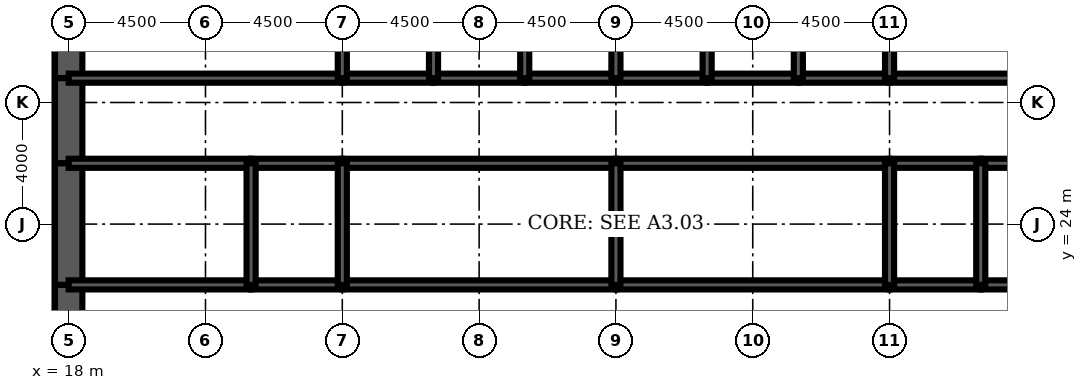
"""IFC4 building model, lengths in metres.
Left out: names, types, materials, properties, quantities, classifications, styles, units other than length and angle.
Written with IfcOpenShell. Run it as: python <this file> out.ifc"""

import sys

from ifc_helpers import new_model, si_unit, direction, frame, frame_2d, origin, place, context, subcontext, project, spatial, rectangle, extrude, element, fill, save


model = new_model("IFC4")
c1 = context("Model", 3, precision=1e-05, world=origin(), true_north=direction((0.0, 1.0)))
c2 = subcontext(c1, "Body", "Model", "MODEL_VIEW")
j1 = project(units=[si_unit("LENGTHUNIT", "METRE"), si_unit("PLANEANGLEUNIT", "RADIAN")], contexts=[c1])
p1 = place(None, origin())
s1 = spatial("IfcSite", under=j1, at=p1, CompositionType="ELEMENT")
p2 = place(p1, origin())
s2 = spatial("IfcBuilding", under=s1, at=p2, CompositionType="ELEMENT")
p3 = place(p2, frame((0.0, 0.0, 6.0)))
s3 = spatial("IfcBuildingStorey", under=s2, at=p3, CompositionType="ELEMENT", Elevation=6.0)
p4 = place(p3, frame((18.0, 32.0, 0.0), z_axis=(0.0, 0.0, 1.0), x_axis=(0.0, -1.0, 0.0)))
e1 = element("IfcWall", 1, at=p4, inside=s3, PredefinedType="SHEAR", context=c2, shape_type="SweptSolid", body=[
    extrude(rectangle(XDim=3.2, YDim=0.9, at=frame_2d((1.6, 0.0))), origin(), (0.0, 0.0, 1.0), 7.0),
])
p5 = place(p3, frame((18.0, 28.8, 0.0), z_axis=(0.0, 0.0, 1.0), x_axis=(0.0, -1.0, 0.0)))
e2 = element("IfcWall", 2, at=p5, inside=s3, PredefinedType="SHEAR", context=c2, shape_type="SweptSolid", body=[
    extrude(rectangle(XDim=2.8, YDim=0.9, at=frame_2d((1.4, 0.0))), origin(), (0.0, 0.0, 1.0), 7.0),
])
p6 = place(p5, frame((0.4, 0.0, 0.0)))
e3 = element("IfcOpeningElement", 3, at=p6, cuts=e2, PredefinedType="OPENING", context=c2, shape_type="SweptSolid", body=[
    extrude(rectangle(XDim=1.8, YDim=2.1, at=frame_2d((0.9, 1.05))), frame((0.0, 0.46, 0.0), z_axis=(0.0, -1.0, 0.0), x_axis=(1.0, 0.0, 0.0)), (0.0, 0.0, 1.0), 0.92),
])
p7 = place(p3, frame((18.0, 26.0, 0.0), z_axis=(0.0, 0.0, 1.0), x_axis=(0.0, -1.0, 0.0)))
e4 = element("IfcWall", 4, at=p7, inside=s3, PredefinedType="SHEAR", context=c2, shape_type="SweptSolid", body=[
    extrude(rectangle(XDim=4.0, YDim=0.9, at=frame_2d((2.0, 0.0))), origin(), (0.0, 0.0, 1.0), 7.0),
])
p8 = place(p3, frame((18.0, 22.0, 0.0), z_axis=(0.0, 0.0, 1.0), x_axis=(0.0, -1.0, 0.0)))
e5 = element("IfcWall", 5, at=p8, inside=s3, PredefinedType="SHEAR", context=c2, shape_type="SweptSolid", body=[
    extrude(rectangle(XDim=2.8, YDim=0.9, at=frame_2d((1.4, 0.0))), origin(), (0.0, 0.0, 1.0), 7.0),
])
p9 = place(p8, frame((0.6, 0.0, 0.0)))
e6 = element("IfcOpeningElement", 6, at=p9, cuts=e5, PredefinedType="OPENING", context=c2, shape_type="SweptSolid", body=[
    extrude(rectangle(XDim=1.8, YDim=2.1, at=frame_2d((0.9, 1.05))), frame((0.0, 0.46, 0.0), z_axis=(0.0, -1.0, 0.0), x_axis=(1.0, 0.0, 0.0)), (0.0, 0.0, 1.0), 0.92),
])
p10 = place(p3, frame((18.0, 28.8, 0.0), z_axis=(0.0, 0.0, 1.0), x_axis=(1.0, 0.0, 0.0)))
e7 = element("IfcWall", 7, at=p10, inside=s3, PredefinedType="SOLIDWALL", context=c2, shape_type="SweptSolid", body=[
    extrude(rectangle(XDim=9.0, YDim=0.3, at=frame_2d((4.5, 0.0))), origin(), (0.0, 0.0, 1.0), 7.0),
])
p11 = place(p10, frame((0.65, 0.0, 0.0)))
e8 = element("IfcOpeningElement", 8, at=p11, cuts=e7, PredefinedType="OPENING", context=c2, shape_type="SweptSolid", body=[
    extrude(rectangle(XDim=1.0, YDim=2.1, at=frame_2d((0.5, 1.05))), frame((0.0, 0.16, 0.0), z_axis=(0.0, -1.0, 0.0), x_axis=(1.0, 0.0, 0.0)), (0.0, 0.0, 1.0), 0.32),
])
p12 = place(p3, frame((27.0, 28.8, 0.0), z_axis=(0.0, 0.0, 1.0), x_axis=(1.0, 0.0, 0.0)))
e9 = element("IfcWall", 9, at=p12, inside=s3, PredefinedType="SOLIDWALL", context=c2, shape_type="SweptSolid", body=[
    extrude(rectangle(XDim=3.0, YDim=0.3, at=frame_2d((1.5, 0.0))), origin(), (0.0, 0.0, 1.0), 7.0),
])
p13 = place(p12, frame((0.95, 0.0, 0.0)))
e10 = element("IfcOpeningElement", 10, at=p13, cuts=e9, PredefinedType="OPENING", context=c2, shape_type="SweptSolid", body=[
    extrude(rectangle(XDim=1.1, YDim=2.2, at=frame_2d((0.55, 1.1))), frame((0.0, 0.16, 0.0), z_axis=(0.0, -1.0, 0.0), x_axis=(1.0, 0.0, 0.0)), (0.0, 0.0, 1.0), 0.32),
])
p14 = place(p3, frame((30.0, 28.8, 0.0), z_axis=(0.0, 0.0, 1.0), x_axis=(1.0, 0.0, 0.0)))
e11 = element("IfcWall", 11, at=p14, inside=s3, PredefinedType="SOLIDWALL", context=c2, shape_type="SweptSolid", body=[
    extrude(rectangle(XDim=3.0, YDim=0.3, at=frame_2d((1.5, 0.0))), origin(), (0.0, 0.0, 1.0), 7.0),
])
p15 = place(p14, frame((0.95, 0.0, 0.0)))
e12 = element("IfcOpeningElement", 12, at=p15, cuts=e11, PredefinedType="OPENING", context=c2, shape_type="SweptSolid", body=[
    extrude(rectangle(XDim=1.1, YDim=2.2, at=frame_2d((0.55, 1.1))), frame((0.0, 0.16, 0.0), z_axis=(0.0, -1.0, 0.0), x_axis=(1.0, 0.0, 0.0)), (0.0, 0.0, 1.0), 0.32),
])
p16 = place(p3, frame((33.0, 28.8, 0.0), z_axis=(0.0, 0.0, 1.0), x_axis=(1.0, 0.0, 0.0)))
e13 = element("IfcWall", 13, at=p16, inside=s3, PredefinedType="SOLIDWALL", context=c2, shape_type="SweptSolid", body=[
    extrude(rectangle(XDim=3.0, YDim=0.3, at=frame_2d((1.5, 0.0))), origin(), (0.0, 0.0, 1.0), 7.0),
])
p17 = place(p16, frame((0.95, 0.0, 0.0)))
e14 = element("IfcOpeningElement", 14, at=p17, cuts=e13, PredefinedType="OPENING", context=c2, shape_type="SweptSolid", body=[
    extrude(rectangle(XDim=1.1, YDim=2.2, at=frame_2d((0.55, 1.1))), frame((0.0, 0.16, 0.0), z_axis=(0.0, -1.0, 0.0), x_axis=(1.0, 0.0, 0.0)), (0.0, 0.0, 1.0), 0.32),
])
for number, where, z_axis, x_axis in (
    (15, (36.0, 28.8, 0.0), (0.0, 0.0, 1.0), (1.0, 0.0, 0.0)),
    (16, (39.0, 28.8, 0.0), (0.0, 0.0, 1.0), (1.0, 0.0, 0.0)),
):
    element("IfcWall", number, at=place(p3, frame(where, z_axis=z_axis, x_axis=x_axis)), inside=s3, PredefinedType="SOLIDWALL", context=c2, shape_type="SweptSolid", body=[
        extrude(rectangle(XDim=3.0, YDim=0.3, at=frame_2d((1.5, 0.0))), origin(), (0.0, 0.0, 1.0), 7.0),
    ])
p18 = place(p3, frame((42.0, 28.8, 0.0), z_axis=(0.0, 0.0, 1.0), x_axis=(1.0, 0.0, 0.0)))
e17 = element("IfcWall", 17, at=p18, inside=s3, PredefinedType="SOLIDWALL", context=c2, shape_type="SweptSolid", body=[
    extrude(rectangle(XDim=3.0, YDim=0.3, at=frame_2d((1.5, 0.0))), origin(), (0.0, 0.0, 1.0), 7.0),
])
p19 = place(p18, frame((0.95, 0.0, 0.0)))
e18 = element("IfcOpeningElement", 18, at=p19, cuts=e17, PredefinedType="OPENING", context=c2, shape_type="SweptSolid", body=[
    extrude(rectangle(XDim=1.1, YDim=2.2, at=frame_2d((0.55, 1.1))), frame((0.0, 0.16, 0.0), z_axis=(0.0, -1.0, 0.0), x_axis=(1.0, 0.0, 0.0)), (0.0, 0.0, 1.0), 0.32),
])
p20 = place(p3, frame((45.0, 28.8, 0.0), z_axis=(0.0, 0.0, 1.0), x_axis=(1.0, 0.0, 0.0)))
e19 = element("IfcWall", 19, at=p20, inside=s3, PredefinedType="SOLIDWALL", context=c2, shape_type="SweptSolid", body=[
    extrude(rectangle(XDim=9.0, YDim=0.3, at=frame_2d((4.5, 0.0))), origin(), (0.0, 0.0, 1.0), 7.0),
])
p21 = place(p20, frame((7.35, 0.0, 0.0)))
e20 = element("IfcOpeningElement", 20, at=p21, cuts=e19, PredefinedType="OPENING", context=c2, shape_type="SweptSolid", body=[
    extrude(rectangle(XDim=1.0, YDim=2.1, at=frame_2d((0.5, 1.05))), frame((0.0, 0.16, 0.0), z_axis=(0.0, -1.0, 0.0), x_axis=(1.0, 0.0, 0.0)), (0.0, 0.0, 1.0), 0.32),
])
p22 = place(p3, frame((18.0, 22.0, 0.0), z_axis=(0.0, 0.0, 1.0), x_axis=(1.0, 0.0, 0.0)))
e21 = element("IfcWall", 21, at=p22, inside=s3, PredefinedType="SOLIDWALL", context=c2, shape_type="SweptSolid", body=[
    extrude(rectangle(XDim=6.0, YDim=0.3, at=frame_2d((3.0, 0.0))), origin(), (0.0, 0.0, 1.0), 7.0),
])
p23 = place(p22, frame((4.4, 0.0, 0.0)))
e22 = element("IfcOpeningElement", 22, at=p23, cuts=e21, PredefinedType="OPENING", context=c2, shape_type="SweptSolid", body=[
    extrude(rectangle(XDim=1.0, YDim=2.1, at=frame_2d((0.5, 1.05))), frame((0.0, 0.16, 0.0), z_axis=(0.0, -1.0, 0.0), x_axis=(1.0, 0.0, 0.0)), (0.0, 0.0, 1.0), 0.32),
])
p24 = place(p22, frame((0.7, 0.0, 0.0)))
e23 = element("IfcOpeningElement", 23, at=p24, cuts=e21, PredefinedType="OPENING", context=c2, shape_type="SweptSolid", body=[
    extrude(rectangle(XDim=1.0, YDim=2.1, at=frame_2d((0.5, 1.05))), frame((0.0, 0.16, 0.0), z_axis=(0.0, -1.0, 0.0), x_axis=(1.0, 0.0, 0.0)), (0.0, 0.0, 1.0), 0.32),
])
p25 = place(p3, frame((24.0, 22.0, 0.0), z_axis=(0.0, 0.0, 1.0), x_axis=(1.0, 0.0, 0.0)))
e24 = element("IfcWall", 24, at=p25, inside=s3, PredefinedType="SOLIDWALL", context=c2, shape_type="SweptSolid", body=[
    extrude(rectangle(XDim=3.0, YDim=0.3, at=frame_2d((1.5, 0.0))), origin(), (0.0, 0.0, 1.0), 7.0),
])
p26 = place(p25, frame((1.0, 0.0, 0.0)))
e25 = element("IfcOpeningElement", 25, at=p26, cuts=e24, PredefinedType="OPENING", context=c2, shape_type="SweptSolid", body=[
    extrude(rectangle(XDim=1.0, YDim=2.1, at=frame_2d((0.5, 1.05))), frame((0.0, 0.16, 0.0), z_axis=(0.0, -1.0, 0.0), x_axis=(1.0, 0.0, 0.0)), (0.0, 0.0, 1.0), 0.32),
])
p27 = place(p3, frame((27.0, 22.0, 0.0), z_axis=(0.0, 0.0, 1.0), x_axis=(1.0, 0.0, 0.0)))
e26 = element("IfcWall", 26, at=p27, inside=s3, PredefinedType="SOLIDWALL", context=c2, shape_type="SweptSolid", body=[
    extrude(rectangle(XDim=9.0, YDim=0.3, at=frame_2d((4.5, 0.0))), origin(), (0.0, 0.0, 1.0), 7.0),
])
p28 = place(p27, frame((4.0, 0.0, 0.0)))
e27 = element("IfcOpeningElement", 27, at=p28, cuts=e26, PredefinedType="OPENING", context=c2, shape_type="SweptSolid", body=[
    extrude(rectangle(XDim=1.0, YDim=2.1, at=frame_2d((0.5, 1.05))), frame((0.0, 0.16, 0.0), z_axis=(0.0, -1.0, 0.0), x_axis=(1.0, 0.0, 0.0)), (0.0, 0.0, 1.0), 0.32),
])
p29 = place(p3, frame((36.0, 22.0, 0.0), z_axis=(0.0, 0.0, 1.0), x_axis=(1.0, 0.0, 0.0)))
e28 = element("IfcWall", 28, at=p29, inside=s3, PredefinedType="SOLIDWALL", context=c2, shape_type="SweptSolid", body=[
    extrude(rectangle(XDim=9.0, YDim=0.3, at=frame_2d((4.5, 0.0))), origin(), (0.0, 0.0, 1.0), 7.0),
])
p30 = place(p29, frame((4.0, 0.0, 0.0)))
e29 = element("IfcOpeningElement", 29, at=p30, cuts=e28, PredefinedType="OPENING", context=c2, shape_type="SweptSolid", body=[
    extrude(rectangle(XDim=1.0, YDim=2.1, at=frame_2d((0.5, 1.05))), frame((0.0, 0.16, 0.0), z_axis=(0.0, -1.0, 0.0), x_axis=(1.0, 0.0, 0.0)), (0.0, 0.0, 1.0), 0.32),
])
p31 = place(p3, frame((45.0, 22.0, 0.0), z_axis=(0.0, 0.0, 1.0), x_axis=(1.0, 0.0, 0.0)))
e30 = element("IfcWall", 30, at=p31, inside=s3, PredefinedType="SOLIDWALL", context=c2, shape_type="SweptSolid", body=[
    extrude(rectangle(XDim=3.0, YDim=0.3, at=frame_2d((1.5, 0.0))), origin(), (0.0, 0.0, 1.0), 7.0),
])
p32 = place(p31, frame((1.0, 0.0, 0.0)))
e31 = element("IfcOpeningElement", 31, at=p32, cuts=e30, PredefinedType="OPENING", context=c2, shape_type="SweptSolid", body=[
    extrude(rectangle(XDim=1.0, YDim=2.1, at=frame_2d((0.5, 1.05))), frame((0.0, 0.16, 0.0), z_axis=(0.0, -1.0, 0.0), x_axis=(1.0, 0.0, 0.0)), (0.0, 0.0, 1.0), 0.32),
])
p33 = place(p3, frame((48.0, 22.0, 0.0), z_axis=(0.0, 0.0, 1.0), x_axis=(1.0, 0.0, 0.0)))
e32 = element("IfcWall", 32, at=p33, inside=s3, PredefinedType="SOLIDWALL", context=c2, shape_type="SweptSolid", body=[
    extrude(rectangle(XDim=6.0, YDim=0.3, at=frame_2d((3.0, 0.0))), origin(), (0.0, 0.0, 1.0), 7.0),
])
p34 = place(p33, frame((2.0, 0.0, 0.0)))
e33 = element("IfcOpeningElement", 33, at=p34, cuts=e32, PredefinedType="OPENING", context=c2, shape_type="SweptSolid", body=[
    extrude(rectangle(XDim=1.0, YDim=2.1, at=frame_2d((0.5, 1.05))), frame((0.0, 0.16, 0.0), z_axis=(0.0, -1.0, 0.0), x_axis=(1.0, 0.0, 0.0)), (0.0, 0.0, 1.0), 0.32),
])
p35 = place(p33, frame((4.3, 0.0, 0.0)))
e34 = element("IfcOpeningElement", 34, at=p35, cuts=e32, PredefinedType="OPENING", context=c2, shape_type="SweptSolid", body=[
    extrude(rectangle(XDim=1.0, YDim=2.1, at=frame_2d((0.5, 1.05))), frame((0.0, 0.16, 0.0), z_axis=(0.0, -1.0, 0.0), x_axis=(1.0, 0.0, 0.0)), (0.0, 0.0, 1.0), 0.32),
])
p36 = place(p3, frame((18.0, 26.0, 0.0), z_axis=(0.0, 0.0, 1.0), x_axis=(1.0, 0.0, 0.0)))
e35 = element("IfcWall", 35, at=p36, inside=s3, PredefinedType="SOLIDWALL", context=c2, shape_type="SweptSolid", body=[
    extrude(rectangle(XDim=6.0, YDim=0.3, at=frame_2d((3.0, 0.0))), origin(), (0.0, 0.0, 1.0), 7.0),
])
p37 = place(p3, frame((24.0, 26.0, 0.0), z_axis=(0.0, 0.0, 1.0), x_axis=(1.0, 0.0, 0.0)))
e36 = element("IfcWall", 36, at=p37, inside=s3, PredefinedType="SOLIDWALL", context=c2, shape_type="SweptSolid", body=[
    extrude(rectangle(XDim=3.0, YDim=0.3, at=frame_2d((1.5, 0.0))), origin(), (0.0, 0.0, 1.0), 7.0),
])
for number, where, z_axis, x_axis in (
    (37, (27.0, 26.0, 0.0), (0.0, 0.0, 1.0), (1.0, 0.0, 0.0)),
    (38, (36.0, 26.0, 0.0), (0.0, 0.0, 1.0), (1.0, 0.0, 0.0)),
):
    element("IfcWall", number, at=place(p3, frame(where, z_axis=z_axis, x_axis=x_axis)), inside=s3, PredefinedType="SOLIDWALL", context=c2, shape_type="SweptSolid", body=[
        extrude(rectangle(XDim=9.0, YDim=0.3, at=frame_2d((4.5, 0.0))), origin(), (0.0, 0.0, 1.0), 7.0),
    ])
p38 = place(p3, frame((45.0, 26.0, 0.0), z_axis=(0.0, 0.0, 1.0), x_axis=(1.0, 0.0, 0.0)))
e39 = element("IfcWall", 39, at=p38, inside=s3, PredefinedType="SOLIDWALL", context=c2, shape_type="SweptSolid", body=[
    extrude(rectangle(XDim=3.0, YDim=0.3, at=frame_2d((1.5, 0.0))), origin(), (0.0, 0.0, 1.0), 7.0),
])
p39 = place(p3, frame((48.0, 26.0, 0.0), z_axis=(0.0, 0.0, 1.0), x_axis=(1.0, 0.0, 0.0)))
e40 = element("IfcWall", 40, at=p39, inside=s3, PredefinedType="SOLIDWALL", context=c2, shape_type="SweptSolid", body=[
    extrude(rectangle(XDim=6.0, YDim=0.3, at=frame_2d((3.0, 0.0))), origin(), (0.0, 0.0, 1.0), 7.0),
])
for number, where, z_axis, x_axis in (
    (41, (27.0, 28.8, 0.0), (0.0, 0.0, 1.0), (0.0, 1.0, 0.0)),
    (42, (30.0, 28.8, 0.0), (0.0, 0.0, 1.0), (0.0, 1.0, 0.0)),
    (43, (33.0, 28.8, 0.0), (0.0, 0.0, 1.0), (0.0, 1.0, 0.0)),
    (44, (36.0, 28.8, 0.0), (0.0, 0.0, 1.0), (0.0, 1.0, 0.0)),
    (45, (39.0, 28.8, 0.0), (0.0, 0.0, 1.0), (0.0, 1.0, 0.0)),
    (46, (42.0, 28.8, 0.0), (0.0, 0.0, 1.0), (0.0, 1.0, 0.0)),
    (47, (45.0, 28.8, 0.0), (0.0, 0.0, 1.0), (0.0, 1.0, 0.0)),
):
    element("IfcWall", number, at=place(p3, frame(where, z_axis=z_axis, x_axis=x_axis)), inside=s3, PredefinedType="SOLIDWALL", context=c2, shape_type="SweptSolid", body=[
        extrude(rectangle(XDim=3.2, YDim=0.3, at=frame_2d((1.6, 0.0))), origin(), (0.0, 0.0, 1.0), 7.0),
    ])
for number, where, z_axis, x_axis in (
    (48, (24.0, 22.0, 0.0), (0.0, 0.0, 1.0), (0.0, 1.0, 0.0)),
    (49, (27.0, 22.0, 0.0), (0.0, 0.0, 1.0), (0.0, 1.0, 0.0)),
    (50, (36.0, 22.0, 0.0), (0.0, 0.0, 1.0), (0.0, 1.0, 0.0)),
    (51, (45.0, 22.0, 0.0), (0.0, 0.0, 1.0), (0.0, 1.0, 0.0)),
    (52, (48.0, 22.0, 0.0), (0.0, 0.0, 1.0), (0.0, 1.0, 0.0)),
):
    element("IfcWall", number, at=place(p3, frame(where, z_axis=z_axis, x_axis=x_axis)), inside=s3, PredefinedType="SOLIDWALL", context=c2, shape_type="SweptSolid", body=[
        extrude(rectangle(XDim=4.0, YDim=0.3, at=frame_2d((2.0, 0.0))), origin(), (0.0, 0.0, 1.0), 7.0),
    ])
p40 = place(p3, frame((38.5, 22.15, 0.0), z_axis=(0.0, 0.0, 1.0), x_axis=(0.0, 1.0, 0.0)))
e53 = element("IfcWall", 53, at=p40, inside=s3, PredefinedType="PARTITIONING", context=c2, shape_type="SweptSolid", body=[
    extrude(rectangle(XDim=3.7, YDim=0.15, at=frame_2d((1.85, 0.0))), origin(), (0.0, 0.0, 1.0), 3.0),
])
p41 = place(p40, frame((2.2, 0.0, 0.0)))
e54 = element("IfcOpeningElement", 54, at=p41, cuts=e53, PredefinedType="OPENING", context=c2, shape_type="SweptSolid", body=[
    extrude(rectangle(XDim=1.0, YDim=2.1, at=frame_2d((0.5, 1.05))), frame((0.0, 0.085, 0.0), z_axis=(0.0, -1.0, 0.0), x_axis=(1.0, 0.0, 0.0)), (0.0, 0.0, 1.0), 0.17),
])
p42 = place(p3, frame((20.025, 22.15, 0.0), z_axis=(0.0, 0.0, 1.0), x_axis=(0.0, 1.0, 0.0)))
e55 = element("IfcWall", 55, at=p42, inside=s3, PredefinedType="PARTITIONING", context=c2, shape_type="SweptSolid", body=[
    extrude(rectangle(XDim=3.7, YDim=0.15, at=frame_2d((1.85, 0.0))), origin(), (0.0, 0.0, 1.0), 3.0),
])
p43 = place(p3, frame((22.2, 26.15, 0.0), z_axis=(0.0, 0.0, 1.0), x_axis=(0.0, 1.0, 0.0)))
e56 = element("IfcWall", 56, at=p43, inside=s3, PredefinedType="PARTITIONING", context=c2, shape_type="SweptSolid", body=[
    extrude(rectangle(XDim=2.5, YDim=0.15, at=frame_2d((1.25, 0.0))), origin(), (0.0, 0.0, 1.0), 3.0),
])
p44 = place(p43, frame((0.35, 0.0, 0.0)))
e57 = element("IfcOpeningElement", 57, at=p44, cuts=e56, PredefinedType="OPENING", context=c2, shape_type="SweptSolid", body=[
    extrude(rectangle(XDim=1.0, YDim=2.1, at=frame_2d((0.5, 1.05))), frame((0.0, 0.085, 0.0), z_axis=(0.0, -1.0, 0.0), x_axis=(1.0, 0.0, 0.0)), (0.0, 0.0, 1.0), 0.17),
])
p45 = place(p41, origin())
e58 = element("IfcDoor", 58, at=p45, inside=s3, OperationType="SINGLE_SWING_RIGHT", PredefinedType="DOOR", context=c2, shape_type="SweptSolid", body=[
    extrude(rectangle(XDim=1.0, YDim=2.1, at=frame_2d((0.5, 1.05))), frame((0.0, 0.025, 0.0), z_axis=(0.0, -1.0, 0.0), x_axis=(1.0, 0.0, 0.0)), (0.0, 0.0, 1.0), 0.05),
])
fill(e54, e58)
p46 = place(p44, origin())
e59 = element("IfcDoor", 59, at=p46, inside=s3, OperationType="SINGLE_SWING_LEFT", PredefinedType="DOOR", context=c2, shape_type="SweptSolid", body=[
    extrude(rectangle(XDim=1.0, YDim=2.1, at=frame_2d((0.5, 1.05))), frame((0.0, 0.025, 0.0), z_axis=(0.0, -1.0, 0.0), x_axis=(1.0, 0.0, 0.0)), (0.0, 0.0, 1.0), 0.05),
])
fill(e57, e59)
p47 = place(p19, origin())
e60 = element("IfcDoor", 60, at=p47, inside=s3, OperationType="DOUBLE_DOOR_SLIDING", PredefinedType="USERDEFINED", context=c2, shape_type="SweptSolid", body=[
    extrude(rectangle(XDim=1.1, YDim=2.2, at=frame_2d((0.55, 1.1))), frame((0.0, 0.025, 0.0), z_axis=(0.0, -1.0, 0.0), x_axis=(1.0, 0.0, 0.0)), (0.0, 0.0, 1.0), 0.05),
])
fill(e18, e60)
p48 = place(p13, origin())
e61 = element("IfcDoor", 61, at=p48, inside=s3, OperationType="DOUBLE_DOOR_SLIDING", PredefinedType="USERDEFINED", context=c2, shape_type="SweptSolid", body=[
    extrude(rectangle(XDim=1.1, YDim=2.2, at=frame_2d((0.55, 1.1))), frame((0.0, 0.025, 0.0), z_axis=(0.0, -1.0, 0.0), x_axis=(1.0, 0.0, 0.0)), (0.0, 0.0, 1.0), 0.05),
])
fill(e10, e61)
p49 = place(p15, origin())
e62 = element("IfcDoor", 62, at=p49, inside=s3, OperationType="DOUBLE_DOOR_SLIDING", PredefinedType="USERDEFINED", context=c2, shape_type="SweptSolid", body=[
    extrude(rectangle(XDim=1.1, YDim=2.2, at=frame_2d((0.55, 1.1))), frame((0.0, 0.025, 0.0), z_axis=(0.0, -1.0, 0.0), x_axis=(1.0, 0.0, 0.0)), (0.0, 0.0, 1.0), 0.05),
])
fill(e12, e62)
p50 = place(p17, origin())
e63 = element("IfcDoor", 63, at=p50, inside=s3, OperationType="DOUBLE_DOOR_SLIDING", PredefinedType="USERDEFINED", context=c2, shape_type="SweptSolid", body=[
    extrude(rectangle(XDim=1.1, YDim=2.2, at=frame_2d((0.55, 1.1))), frame((0.0, 0.025, 0.0), z_axis=(0.0, -1.0, 0.0), x_axis=(1.0, 0.0, 0.0)), (0.0, 0.0, 1.0), 0.05),
])
fill(e14, e63)
p51 = place(p11, origin())
e64 = element("IfcDoor", 64, at=p51, inside=s3, OperationType="SINGLE_SWING_LEFT", PredefinedType="DOOR", context=c2, shape_type="SweptSolid", body=[
    extrude(rectangle(XDim=1.0, YDim=2.1, at=frame_2d((0.5, 1.05))), frame((0.0, 0.025, 0.0), z_axis=(0.0, -1.0, 0.0), x_axis=(1.0, 0.0, 0.0)), (0.0, 0.0, 1.0), 0.05),
])
fill(e8, e64)
p52 = place(p9, origin())
e65 = element("IfcDoor", 65, at=p52, inside=s3, OperationType="SINGLE_SWING_LEFT", PredefinedType="DOOR", context=c2, shape_type="SweptSolid", body=[
    extrude(rectangle(XDim=1.8, YDim=2.1, at=frame_2d((0.9, 1.05))), frame((0.0, 0.45, 0.0), z_axis=(0.0, -1.0, 0.0), x_axis=(1.0, 0.0, 0.0)), (0.0, 0.0, 1.0), 0.899),
])
fill(e6, e65)
p53 = place(p6, origin())
e66 = element("IfcDoor", 66, at=p53, inside=s3, OperationType="SINGLE_SWING_LEFT", PredefinedType="DOOR", context=c2, shape_type="SweptSolid", body=[
    extrude(rectangle(XDim=1.8, YDim=2.1, at=frame_2d((0.9, 1.05))), frame((0.0, 0.45, 0.0), z_axis=(0.0, -1.0, 0.0), x_axis=(1.0, 0.0, 0.0)), (0.0, 0.0, 1.0), 0.899),
])
fill(e3, e66)
p54 = place(p23, origin())
e67 = element("IfcDoor", 67, at=p54, inside=s3, OperationType="SINGLE_SWING_RIGHT", PredefinedType="DOOR", context=c2, shape_type="SweptSolid", body=[
    extrude(rectangle(XDim=1.0, YDim=2.1, at=frame_2d((0.5, 1.05))), frame((0.0, 0.025, 0.0), z_axis=(0.0, -1.0, 0.0), x_axis=(1.0, 0.0, 0.0)), (0.0, 0.0, 1.0), 0.05),
])
fill(e22, e67)
p55 = place(p26, origin())
e68 = element("IfcDoor", 68, at=p55, inside=s3, OperationType="SINGLE_SWING_LEFT", PredefinedType="DOOR", context=c2, shape_type="SweptSolid", body=[
    extrude(rectangle(XDim=1.0, YDim=2.1, at=frame_2d((0.5, 1.05))), frame((0.0, 0.025, 0.0), z_axis=(0.0, -1.0, 0.0), x_axis=(1.0, 0.0, 0.0)), (0.0, 0.0, 1.0), 0.05),
])
fill(e25, e68)
p56 = place(p28, origin())
e69 = element("IfcDoor", 69, at=p56, inside=s3, OperationType="SINGLE_SWING_LEFT", PredefinedType="DOOR", context=c2, shape_type="SweptSolid", body=[
    extrude(rectangle(XDim=1.0, YDim=2.1, at=frame_2d((0.5, 1.05))), frame((0.0, 0.025, 0.0), z_axis=(0.0, -1.0, 0.0), x_axis=(1.0, 0.0, 0.0)), (0.0, 0.0, 1.0), 0.05),
])
fill(e27, e69)
p57 = place(p30, origin())
e70 = element("IfcDoor", 70, at=p57, inside=s3, OperationType="SINGLE_SWING_LEFT", PredefinedType="DOOR", context=c2, shape_type="SweptSolid", body=[
    extrude(rectangle(XDim=1.0, YDim=2.1, at=frame_2d((0.5, 1.05))), frame((0.0, 0.025, 0.0), z_axis=(0.0, -1.0, 0.0), x_axis=(1.0, 0.0, 0.0)), (0.0, 0.0, 1.0), 0.05),
])
fill(e29, e70)
p58 = place(p32, origin())
e71 = element("IfcDoor", 71, at=p58, inside=s3, OperationType="SINGLE_SWING_LEFT", PredefinedType="DOOR", context=c2, shape_type="SweptSolid", body=[
    extrude(rectangle(XDim=1.0, YDim=2.1, at=frame_2d((0.5, 1.05))), frame((0.0, 0.025, 0.0), z_axis=(0.0, -1.0, 0.0), x_axis=(1.0, 0.0, 0.0)), (0.0, 0.0, 1.0), 0.05),
])
fill(e31, e71)
p59 = place(p24, origin())
e72 = element("IfcDoor", 72, at=p59, inside=s3, OperationType="SINGLE_SWING_LEFT", PredefinedType="DOOR", context=c2, shape_type="SweptSolid", body=[
    extrude(rectangle(XDim=1.0, YDim=2.1, at=frame_2d((0.5, 1.05))), frame((0.0, 0.025, 0.0), z_axis=(0.0, -1.0, 0.0), x_axis=(1.0, 0.0, 0.0)), (0.0, 0.0, 1.0), 0.05),
])
fill(e23, e72)
save(model, sys.argv[1])
